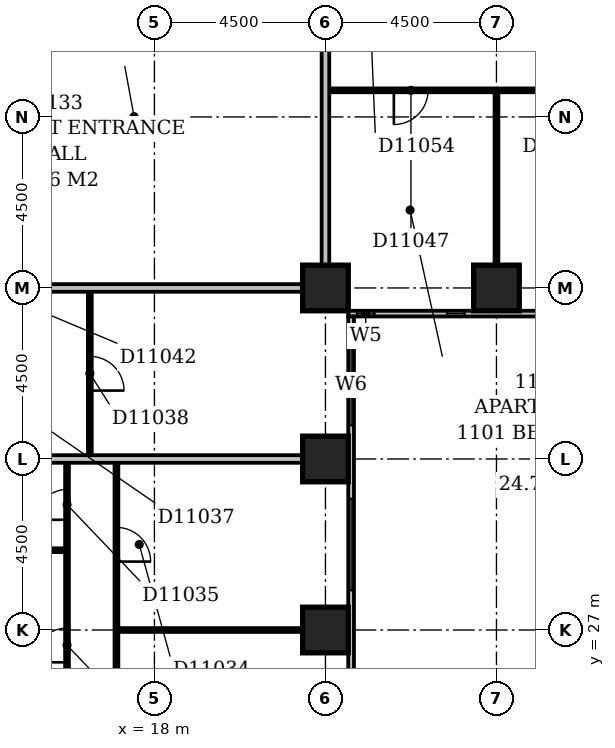
"""IFC4 building model, lengths in metres.
Left out: names, types, materials, properties, quantities, classifications, styles, units other than length and angle.
Written with IfcOpenShell. Run it as: python <this file> out.ifc"""

import sys

from ifc_helpers import new_model, si_unit, direction, frame, frame_2d, origin, origin_2d, place, context, subcontext, project, spatial, rectangle, extrude, element, fill, save


model = new_model("IFC4")
c1 = context("Model", 3, precision=1e-05, world=origin(), true_north=direction((0.0, 1.0)))
c2 = subcontext(c1, "Body", "Model", "MODEL_VIEW")
j1 = project(units=[si_unit("LENGTHUNIT", "METRE"), si_unit("PLANEANGLEUNIT", "RADIAN")], contexts=[c1])
p1 = place(None, origin())
s1 = spatial("IfcSite", under=j1, at=p1, CompositionType="ELEMENT")
p2 = place(p1, origin())
s2 = spatial("IfcBuilding", under=s1, at=p2, CompositionType="ELEMENT")
p3 = place(p2, frame((0.0, 0.0, 50.6)))
s3 = spatial("IfcBuildingStorey", under=s2, at=p3, CompositionType="ELEMENT", Elevation=50.6)
for number, where, z_axis, x_axis in (
    (1, (22.5, 27.0, -0.3), (0.0, 0.0, 1.0), (1.0, 0.0, 0.0)),
    (2, (22.5, 31.5, -0.3), (0.0, 0.0, 1.0), (1.0, 0.0, 0.0)),
    (3, (22.5, 36.0, -0.3), (0.0, 0.0, 1.0), (1.0, 0.0, 0.0)),
    (4, (27.0, 36.0, -0.3), (0.0, 0.0, 1.0), (1.0, 0.0, 0.0)),
):
    element("IfcColumn", number, at=place(p3, frame(where, z_axis=z_axis, x_axis=x_axis)), inside=s3, PredefinedType="COLUMN", context=c2, shape_type="SweptSolid", body=[
        extrude(rectangle(XDim=1.2, YDim=1.2, at=origin_2d()), origin(), (0.0, 0.0, 1.0), 3.6),
    ])
p4 = place(p3, frame((23.175, 17.4, 0.0), z_axis=(0.0, 0.0, 1.0), x_axis=(0.0, 1.0, 0.0)))
e5 = element("IfcWall", 5, at=p4, inside=s3, PredefinedType="STANDARD", context=c2, shape_type="SweptSolid", body=[
    extrude(rectangle(XDim=17.85, YDim=0.15, at=frame_2d((8.925, 0.0))), origin(), (0.0, 0.0, 1.0), 2.7),
])
p5 = place(p4, frame((3.375, 0.0, 0.6)))
e6 = element("IfcOpeningElement", 6, at=p5, cuts=e5, PredefinedType="OPENING", context=c2, shape_type="SweptSolid", body=[
    extrude(rectangle(XDim=0.9, YDim=1.8, at=frame_2d((0.45, 0.9))), frame((0.0, 0.087, 0.0), z_axis=(0.0, -1.0, 0.0), x_axis=(1.0, 0.0, 0.0)), (0.0, 0.0, 1.0), 0.174),
])
p6 = place(p4, frame((6.15, 0.0, 0.6)))
e7 = element("IfcOpeningElement", 7, at=p6, cuts=e5, PredefinedType="OPENING", context=c2, shape_type="SweptSolid", body=[
    extrude(rectangle(XDim=2.4, YDim=1.8, at=frame_2d((1.2, 0.9))), frame((0.0, 0.087, 0.0), z_axis=(0.0, -1.0, 0.0), x_axis=(1.0, 0.0, 0.0)), (0.0, 0.0, 1.0), 0.174),
])
p7 = place(p4, frame((10.65, 0.0, 0.6)))
e8 = element("IfcOpeningElement", 8, at=p7, cuts=e5, PredefinedType="OPENING", context=c2, shape_type="SweptSolid", body=[
    extrude(rectangle(XDim=2.4, YDim=1.8, at=frame_2d((1.2, 0.9))), frame((0.0, 0.087, 0.0), z_axis=(0.0, -1.0, 0.0), x_axis=(1.0, 0.0, 0.0)), (0.0, 0.0, 1.0), 0.174),
])
p8 = place(p4, frame((14.992, 0.0, 0.6)))
e9 = element("IfcOpeningElement", 9, at=p8, cuts=e5, PredefinedType="OPENING", context=c2, shape_type="SweptSolid", body=[
    extrude(rectangle(XDim=2.1, YDim=1.8, at=frame_2d((1.05, 0.9))), frame((0.0, 0.087, 0.0), z_axis=(0.0, -1.0, 0.0), x_axis=(1.0, 0.0, 0.0)), (0.0, 0.0, 1.0), 0.174),
])
p9 = place(p3, frame((23.1, 35.325, 0.0), z_axis=(0.0, 0.0, 1.0), x_axis=(1.0, 0.0, 0.0)))
e10 = element("IfcWall", 10, at=p9, inside=s3, PredefinedType="STANDARD", context=c2, shape_type="SweptSolid", body=[
    extrude(rectangle(XDim=45.15, YDim=0.15, at=frame_2d((22.575, 0.0))), origin(), (0.0, 0.0, 1.0), 2.7),
])
p10 = place(p9, frame((0.235, 0.0, 0.6)))
e11 = element("IfcOpeningElement", 11, at=p10, cuts=e10, PredefinedType="OPENING", context=c2, shape_type="SweptSolid", body=[
    extrude(rectangle(XDim=0.45, YDim=1.8, at=frame_2d((0.225, 0.9))), frame((0.0, 0.087, 0.0), z_axis=(0.0, -1.0, 0.0), x_axis=(1.0, 0.0, 0.0)), (0.0, 0.0, 1.0), 0.174),
])
p11 = place(p9, frame((2.605, 0.0, 0.6)))
e12 = element("IfcOpeningElement", 12, at=p11, cuts=e10, PredefinedType="OPENING", context=c2, shape_type="SweptSolid", body=[
    extrude(rectangle(XDim=0.45, YDim=1.8, at=frame_2d((0.225, 0.9))), frame((0.0, 0.087, 0.0), z_axis=(0.0, -1.0, 0.0), x_axis=(1.0, 0.0, 0.0)), (0.0, 0.0, 1.0), 0.174),
])
p12 = place(p9, frame((4.95, 0.0, 0.6)))
e13 = element("IfcOpeningElement", 13, at=p12, cuts=e10, PredefinedType="OPENING", context=c2, shape_type="SweptSolid", body=[
    extrude(rectangle(XDim=2.4, YDim=1.8, at=frame_2d((1.2, 0.9))), frame((0.0, 0.087, 0.0), z_axis=(0.0, -1.0, 0.0), x_axis=(1.0, 0.0, 0.0)), (0.0, 0.0, 1.0), 0.174),
])
p13 = place(p9, frame((9.45, 0.0, 0.6)))
e14 = element("IfcOpeningElement", 14, at=p13, cuts=e10, PredefinedType="OPENING", context=c2, shape_type="SweptSolid", body=[
    extrude(rectangle(XDim=2.4, YDim=1.8, at=frame_2d((1.2, 0.9))), frame((0.0, 0.087, 0.0), z_axis=(0.0, -1.0, 0.0), x_axis=(1.0, 0.0, 0.0)), (0.0, 0.0, 1.0), 0.174),
])
p14 = place(p9, frame((13.95, 0.0, 0.6)))
e15 = element("IfcOpeningElement", 15, at=p14, cuts=e10, PredefinedType="OPENING", context=c2, shape_type="SweptSolid", body=[
    extrude(rectangle(XDim=2.4, YDim=1.8, at=frame_2d((1.2, 0.9))), frame((0.0, 0.087, 0.0), z_axis=(0.0, -1.0, 0.0), x_axis=(1.0, 0.0, 0.0)), (0.0, 0.0, 1.0), 0.174),
])
p15 = place(p9, frame((18.45, 0.0, 0.6)))
e16 = element("IfcOpeningElement", 16, at=p15, cuts=e10, PredefinedType="OPENING", context=c2, shape_type="SweptSolid", body=[
    extrude(rectangle(XDim=2.4, YDim=1.8, at=frame_2d((1.2, 0.9))), frame((0.0, 0.087, 0.0), z_axis=(0.0, -1.0, 0.0), x_axis=(1.0, 0.0, 0.0)), (0.0, 0.0, 1.0), 0.174),
])
p16 = place(p9, frame((22.823, 0.0, 0.6)))
e17 = element("IfcOpeningElement", 17, at=p16, cuts=e10, PredefinedType="OPENING", context=c2, shape_type="SweptSolid", body=[
    extrude(rectangle(XDim=1.2, YDim=1.8, at=frame_2d((0.6, 0.9))), frame((0.0, 0.087, 0.0), z_axis=(0.0, -1.0, 0.0), x_axis=(1.0, 0.0, 0.0)), (0.0, 0.0, 1.0), 0.174),
])
p17 = place(p9, frame((29.403, 0.0, 0.6)))
e18 = element("IfcOpeningElement", 18, at=p17, cuts=e10, PredefinedType="OPENING", context=c2, shape_type="SweptSolid", body=[
    extrude(rectangle(XDim=0.6, YDim=1.8, at=frame_2d((0.3, 0.9))), frame((0.0, 0.087, 0.0), z_axis=(0.0, -1.0, 0.0), x_axis=(1.0, 0.0, 0.0)), (0.0, 0.0, 1.0), 0.174),
])
p18 = place(p9, frame((31.95, 0.0, 0.6)))
e19 = element("IfcOpeningElement", 19, at=p18, cuts=e10, PredefinedType="OPENING", context=c2, shape_type="SweptSolid", body=[
    extrude(rectangle(XDim=2.4, YDim=1.8, at=frame_2d((1.2, 0.9))), frame((0.0, 0.087, 0.0), z_axis=(0.0, -1.0, 0.0), x_axis=(1.0, 0.0, 0.0)), (0.0, 0.0, 1.0), 0.174),
])
p19 = place(p9, frame((36.45, 0.0, 0.6)))
e20 = element("IfcOpeningElement", 20, at=p19, cuts=e10, PredefinedType="OPENING", context=c2, shape_type="SweptSolid", body=[
    extrude(rectangle(XDim=2.4, YDim=1.8, at=frame_2d((1.2, 0.9))), frame((0.0, 0.087, 0.0), z_axis=(0.0, -1.0, 0.0), x_axis=(1.0, 0.0, 0.0)), (0.0, 0.0, 1.0), 0.174),
])
p20 = place(p9, frame((40.95, 0.0, 0.6)))
e21 = element("IfcOpeningElement", 21, at=p20, cuts=e10, PredefinedType="OPENING", context=c2, shape_type="SweptSolid", body=[
    extrude(rectangle(XDim=2.4, YDim=1.8, at=frame_2d((1.2, 0.9))), frame((0.0, 0.087, 0.0), z_axis=(0.0, -1.0, 0.0), x_axis=(1.0, 0.0, 0.0)), (0.0, 0.0, 1.0), 0.174),
])
p21 = place(p3, frame((17.0, 22.6, 0.0), z_axis=(0.0, 0.0, 1.0), x_axis=(0.0, 1.0, 0.0)))
e22 = element("IfcWall", 22, at=p21, inside=s3, PredefinedType="PARTITIONING", context=c2, shape_type="SweptSolid", body=[
    extrude(rectangle(XDim=8.8, YDim=0.1, at=frame_2d((4.4, 0.0))), origin(), (0.0, 0.0, 1.0), 3.3),
])
p22 = place(p21, frame((1.7, 0.0, 0.0)))
e23 = element("IfcOpeningElement", 23, at=p22, cuts=e22, PredefinedType="OPENING", context=c2, shape_type="SweptSolid", body=[
    extrude(rectangle(XDim=0.9, YDim=2.1, at=frame_2d((0.45, 1.05))), frame((0.0, 0.062, 0.0), z_axis=(0.0, -1.0, 0.0), x_axis=(1.0, 0.0, 0.0)), (0.0, 0.0, 1.0), 0.124),
])
p23 = place(p21, frame((6.2, 0.0, 0.0)))
e24 = element("IfcOpeningElement", 24, at=p23, cuts=e22, PredefinedType="OPENING", context=c2, shape_type="SweptSolid", body=[
    extrude(rectangle(XDim=0.9, YDim=2.1, at=frame_2d((0.45, 1.05))), frame((0.0, 0.062, 0.0), z_axis=(0.0, -1.0, 0.0), x_axis=(1.0, 0.0, 0.0)), (0.0, 0.0, 1.0), 0.124),
])
p24 = place(p3, frame((15.7, 24.1, 0.0), z_axis=(0.0, 0.0, 1.0), x_axis=(0.0, 1.0, 0.0)))
e25 = element("IfcWall", 25, at=p24, inside=s3, PredefinedType="PARTITIONING", context=c2, shape_type="SweptSolid", body=[
    extrude(rectangle(XDim=7.3, YDim=0.1, at=frame_2d((3.65, 0.0))), origin(), (0.0, 0.0, 1.0), 3.3),
])
p25 = place(p24, frame((5.8, 0.0, 0.0)))
e26 = element("IfcOpeningElement", 26, at=p25, cuts=e25, PredefinedType="OPENING", context=c2, shape_type="SweptSolid", body=[
    extrude(rectangle(XDim=0.8, YDim=2.1, at=frame_2d((0.4, 1.05))), frame((0.0, 0.062, 0.0), z_axis=(0.0, -1.0, 0.0), x_axis=(1.0, 0.0, 0.0)), (0.0, 0.0, 1.0), 0.124),
])
p26 = place(p24, frame((2.05, 0.0, 0.0)))
e27 = element("IfcOpeningElement", 27, at=p26, cuts=e25, PredefinedType="OPENING", context=c2, shape_type="SweptSolid", body=[
    extrude(rectangle(XDim=0.9, YDim=2.1, at=frame_2d((0.45, 1.05))), frame((0.0, 0.062, 0.0), z_axis=(0.0, -1.0, 0.0), x_axis=(1.0, 0.0, 0.0)), (0.0, 0.0, 1.0), 0.124),
])
p27 = place(p3, frame((17.05, 27.0, 0.0), z_axis=(0.0, 0.0, 1.0), x_axis=(1.0, 0.0, 0.0)))
e28 = element("IfcWall", 28, at=p27, inside=s3, PredefinedType="PARTITIONING", context=c2, shape_type="SweptSolid", body=[
    extrude(rectangle(XDim=4.85, YDim=0.1, at=frame_2d((2.425, 0.0))), origin(), (0.0, 0.0, 1.0), 2.7),
])
p28 = place(p3, frame((9.1, 29.1, 0.0), z_axis=(0.0, 0.0, 1.0), x_axis=(1.0, 0.0, 0.0)))
e29 = element("IfcWall", 29, at=p28, inside=s3, PredefinedType="PLUMBINGWALL", context=c2, shape_type="SweptSolid", body=[
    extrude(rectangle(XDim=6.55, YDim=0.1, at=frame_2d((3.275, 0.0))), origin(), (0.0, 0.0, 1.0), 3.3),
])
p29 = place(p3, frame((9.1, 31.5, 0.0), z_axis=(0.0, 0.0, 1.0), x_axis=(1.0, 0.0, 0.0)))
e30 = element("IfcWall", 30, at=p29, inside=s3, PredefinedType="PARTITIONING", context=c2, shape_type="SweptSolid", body=[
    extrude(rectangle(XDim=12.8, YDim=0.2, at=frame_2d((6.4, 0.0))), origin(), (0.0, 0.0, 1.0), 3.3),
])
p30 = place(p3, frame((16.3, 31.6, 0.0), z_axis=(0.0, 0.0, 1.0), x_axis=(0.0, 1.0, 0.0)))
e31 = element("IfcWall", 31, at=p30, inside=s3, PredefinedType="PARTITIONING", context=c2, shape_type="SweptSolid", body=[
    extrude(rectangle(XDim=4.3, YDim=0.1, at=frame_2d((2.15, 0.0))), origin(), (0.0, 0.0, 1.0), 3.3),
])
p31 = place(p30, frame((1.7, 0.0, 0.0)))
e32 = element("IfcOpeningElement", 32, at=p31, cuts=e31, PredefinedType="OPENING", context=c2, shape_type="SweptSolid", body=[
    extrude(rectangle(XDim=0.9, YDim=2.1, at=frame_2d((0.45, 1.05))), frame((0.0, 0.062, 0.0), z_axis=(0.0, -1.0, 0.0), x_axis=(1.0, 0.0, 0.0)), (0.0, 0.0, 1.0), 0.124),
])
p32 = place(p3, frame((9.1, 36.0, 0.0), z_axis=(0.0, 0.0, 1.0), x_axis=(1.0, 0.0, 0.0)))
e33 = element("IfcWall", 33, at=p32, inside=s3, PredefinedType="PARTITIONING", context=c2, shape_type="SweptSolid", body=[
    extrude(rectangle(XDim=12.8, YDim=0.2, at=frame_2d((6.4, 0.0))), origin(), (0.0, 0.0, 1.0), 2.4),
])
p33 = place(p3, frame((22.5, 36.6, 0.0), z_axis=(0.0, 0.0, 1.0), x_axis=(0.0, 1.0, 0.0)))
e34 = element("IfcWall", 34, at=p33, inside=s3, PredefinedType="PARTITIONING", context=c2, shape_type="SweptSolid", body=[
    extrude(rectangle(XDim=12.8, YDim=0.2, at=frame_2d((6.4, 0.0))), origin(), (0.0, 0.0, 1.0), 3.3),
])
p34 = place(p3, frame((27.0, 36.6, 0.0), z_axis=(0.0, 0.0, 1.0), x_axis=(0.0, 1.0, 0.0)))
e35 = element("IfcWall", 35, at=p34, inside=s3, PredefinedType="PARTITIONING", context=c2, shape_type="SweptSolid", body=[
    extrude(rectangle(XDim=4.55, YDim=0.1, at=frame_2d((2.275, 0.0))), origin(), (0.0, 0.0, 1.0), 2.6),
])
p35 = place(p3, frame((22.6, 41.2, 0.0), z_axis=(0.0, 0.0, 1.0), x_axis=(1.0, 0.0, 0.0)))
e36 = element("IfcWall", 36, at=p35, inside=s3, PredefinedType="PARTITIONING", context=c2, shape_type="SweptSolid", body=[
    extrude(rectangle(XDim=17.8, YDim=0.1, at=frame_2d((8.9, 0.0))), origin(), (0.0, 0.0, 1.0), 3.3),
])
p36 = place(p35, frame((1.7, 0.0, 0.0)))
e37 = element("IfcOpeningElement", 37, at=p36, cuts=e36, PredefinedType="OPENING", context=c2, shape_type="SweptSolid", body=[
    extrude(rectangle(XDim=0.9, YDim=2.1, at=frame_2d((0.45, 1.05))), frame((0.0, 0.062, 0.0), z_axis=(0.0, -1.0, 0.0), x_axis=(1.0, 0.0, 0.0)), (0.0, 0.0, 1.0), 0.124),
])
p37 = place(p35, frame((6.2, 0.0, 0.0)))
e38 = element("IfcOpeningElement", 38, at=p37, cuts=e36, PredefinedType="OPENING", context=c2, shape_type="SweptSolid", body=[
    extrude(rectangle(XDim=0.9, YDim=2.1, at=frame_2d((0.45, 1.05))), frame((0.0, 0.062, 0.0), z_axis=(0.0, -1.0, 0.0), x_axis=(1.0, 0.0, 0.0)), (0.0, 0.0, 1.0), 0.124),
])
p38 = place(p35, frame((11.85, 0.0, 0.0)))
e39 = element("IfcOpeningElement", 39, at=p38, cuts=e36, PredefinedType="OPENING", context=c2, shape_type="SweptSolid", body=[
    extrude(rectangle(XDim=0.9, YDim=2.1, at=frame_2d((0.45, 1.05))), frame((0.0, 0.062, 0.0), z_axis=(0.0, -1.0, 0.0), x_axis=(1.0, 0.0, 0.0)), (0.0, 0.0, 1.0), 0.124),
])
p39 = place(p35, frame((15.2, 0.0, 0.0)))
e40 = element("IfcOpeningElement", 40, at=p39, cuts=e36, PredefinedType="OPENING", context=c2, shape_type="SweptSolid", body=[
    extrude(rectangle(XDim=0.9, YDim=2.1, at=frame_2d((0.45, 1.05))), frame((0.0, 0.062, 0.0), z_axis=(0.0, -1.0, 0.0), x_axis=(1.0, 0.0, 0.0)), (0.0, 0.0, 1.0), 0.124),
])
p40 = place(p7, origin())
e41 = element("IfcWindow", 41, at=p40, inside=s3, PartitioningType="SINGLE_PANEL", PredefinedType="WINDOW", context=c2, shape_type="SweptSolid", body=[
    extrude(rectangle(XDim=2.4, YDim=1.8, at=frame_2d((1.2, 0.9))), frame((0.0, 0.03, 0.0), z_axis=(0.0, -1.0, 0.0), x_axis=(1.0, 0.0, 0.0)), (0.0, 0.0, 1.0), 0.06),
])
fill(e8, e41)
p41 = place(p8, origin())
e42 = element("IfcWindow", 42, at=p41, inside=s3, PartitioningType="SINGLE_PANEL", PredefinedType="WINDOW", context=c2, shape_type="SweptSolid", body=[
    extrude(rectangle(XDim=2.1, YDim=1.8, at=frame_2d((1.05, 0.9))), frame((0.0, 0.03, 0.0), z_axis=(0.0, -1.0, 0.0), x_axis=(1.0, 0.0, 0.0)), (0.0, 0.0, 1.0), 0.06),
])
fill(e9, e42)
p42 = place(p10, origin())
e43 = element("IfcWindow", 43, at=p42, inside=s3, PartitioningType="SINGLE_PANEL", PredefinedType="WINDOW", context=c2, shape_type="SweptSolid", body=[
    extrude(rectangle(XDim=0.45, YDim=1.8, at=frame_2d((0.225, 0.9))), frame((0.0, 0.03, 0.0), z_axis=(0.0, -1.0, 0.0), x_axis=(1.0, 0.0, 0.0)), (0.0, 0.0, 1.0), 0.06),
])
fill(e11, e43)
p43 = place(p11, origin())
e44 = element("IfcWindow", 44, at=p43, inside=s3, PartitioningType="SINGLE_PANEL", PredefinedType="WINDOW", context=c2, shape_type="SweptSolid", body=[
    extrude(rectangle(XDim=0.45, YDim=1.8, at=frame_2d((0.225, 0.9))), frame((0.0, 0.03, 0.0), z_axis=(0.0, -1.0, 0.0), x_axis=(1.0, 0.0, 0.0)), (0.0, 0.0, 1.0), 0.06),
])
fill(e12, e44)
p44 = place(p23, frame((0.9, 0.0, 0.0), z_axis=(0.0, 0.0, 1.0), x_axis=(-1.0, 0.0, 0.0)))
e45 = element("IfcDoor", 45, at=p44, inside=s3, OperationType="SINGLE_SWING_RIGHT", PredefinedType="DOOR", context=c2, shape_type="SweptSolid", body=[
    extrude(rectangle(XDim=0.9, YDim=2.1, at=frame_2d((0.45, 1.05))), frame((0.0, 0.025, 0.0), z_axis=(0.0, -1.0, 0.0), x_axis=(1.0, 0.0, 0.0)), (0.0, 0.0, 1.0), 0.05),
])
fill(e24, e45)
p45 = place(p25, origin())
e46 = element("IfcDoor", 46, at=p45, inside=s3, OperationType="SINGLE_SWING_LEFT", PredefinedType="DOOR", context=c2, shape_type="SweptSolid", body=[
    extrude(rectangle(XDim=0.8, YDim=2.1, at=frame_2d((0.4, 1.05))), frame((0.0, 0.025, 0.0), z_axis=(0.0, -1.0, 0.0), x_axis=(1.0, 0.0, 0.0)), (0.0, 0.0, 1.0), 0.05),
])
fill(e26, e46)
p46 = place(p26, origin())
e47 = element("IfcDoor", 47, at=p46, inside=s3, OperationType="SINGLE_SWING_LEFT", PredefinedType="DOOR", context=c2, shape_type="SweptSolid", body=[
    extrude(rectangle(XDim=0.9, YDim=2.1, at=frame_2d((0.45, 1.05))), frame((0.0, 0.025, 0.0), z_axis=(0.0, -1.0, 0.0), x_axis=(1.0, 0.0, 0.0)), (0.0, 0.0, 1.0), 0.05),
])
fill(e27, e47)
p47 = place(p31, frame((0.9, 0.0, 0.0), z_axis=(0.0, 0.0, 1.0), x_axis=(-1.0, 0.0, 0.0)))
e48 = element("IfcDoor", 48, at=p47, inside=s3, OperationType="SINGLE_SWING_RIGHT", PredefinedType="DOOR", context=c2, shape_type="SweptSolid", body=[
    extrude(rectangle(XDim=0.9, YDim=2.1, at=frame_2d((0.45, 1.05))), frame((0.0, 0.025, 0.0), z_axis=(0.0, -1.0, 0.0), x_axis=(1.0, 0.0, 0.0)), (0.0, 0.0, 1.0), 0.05),
])
fill(e32, e48)
p48 = place(p36, frame((0.9, 0.0, 0.0), z_axis=(0.0, 0.0, 1.0), x_axis=(-1.0, 0.0, 0.0)))
e49 = element("IfcDoor", 49, at=p48, inside=s3, OperationType="SINGLE_SWING_RIGHT", PredefinedType="DOOR", context=c2, shape_type="SweptSolid", body=[
    extrude(rectangle(XDim=0.9, YDim=2.1, at=frame_2d((0.45, 1.05))), frame((0.0, 0.025, 0.0), z_axis=(0.0, -1.0, 0.0), x_axis=(1.0, 0.0, 0.0)), (0.0, 0.0, 1.0), 0.05),
])
fill(e37, e49)
save(model, sys.argv[1])
